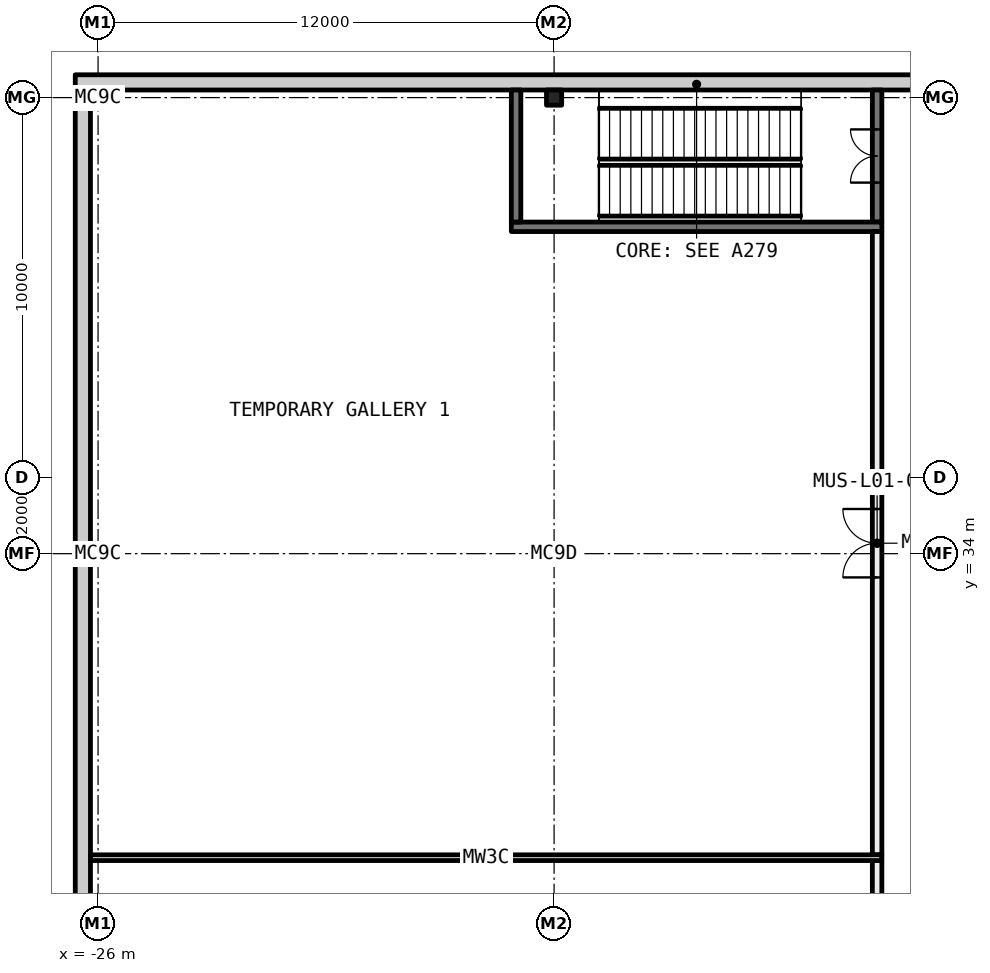
"""IFC4 building model, lengths in metres.
Left out: names, types, materials, properties, quantities, classifications, styles, units other than length and angle.
Written with IfcOpenShell. Run it as: python <this file> out.ifc"""

import sys

from ifc_helpers import new_model, si_unit, direction, frame, frame_2d, origin, origin_2d, place, context, subcontext, project, spatial, rectangle, i_section, extrude, element, fill, save


model = new_model("IFC4")
c1 = context("Model", 3, precision=1e-05, world=origin(), true_north=direction((0.0, 1.0)))
c2 = subcontext(c1, "Body", "Model", "MODEL_VIEW")
j1 = project(units=[si_unit("LENGTHUNIT", "METRE"), si_unit("PLANEANGLEUNIT", "RADIAN")], contexts=[c1])
p1 = place(None, origin())
s1 = spatial("IfcSite", under=j1, at=p1, CompositionType="ELEMENT")
p2 = place(p1, origin())
s2 = spatial("IfcBuilding", under=s1, at=p2, CompositionType="ELEMENT")
p3 = place(p2, frame((0.0, 0.0, 6.0)))
s3 = spatial("IfcBuildingStorey", under=s2, at=p3, CompositionType="ELEMENT", Elevation=6.0)
for number, where, z_axis, x_axis in (
    (1, (-26.0, 34.0, 0.0), (0.0, 0.0, 1.0), (1.0, 0.0, 0.0)),
    (2, (-26.0, 46.0, 0.0), (0.0, 0.0, 1.0), (1.0, 0.0, 0.0)),
    (3, (-14.0, 34.0, 0.0), (0.0, 0.0, 1.0), (1.0, 0.0, 0.0)),
    (4, (-14.0, 46.0, 0.0), (0.0, 0.0, 1.0), (1.0, 0.0, 0.0)),
):
    element("IfcColumn", number, at=place(p3, frame(where, z_axis=z_axis, x_axis=x_axis)), inside=s3, PredefinedType="COLUMN", context=c2, shape_type="SweptSolid", body=[
        extrude(i_section(OverallWidth=0.4, OverallDepth=0.4, WebThickness=0.013, FlangeThickness=0.021, FilletRadius=0.022, at=origin_2d()), origin(), (0.0, 0.0, 1.0), 5.6),
    ])
p4 = place(p3, frame((-5.5, 12.1, 0.0), z_axis=(0.0, 0.0, 1.0), x_axis=(0.0, 1.0, 0.0)))
e5 = element("IfcWall", 5, at=p4, inside=s3, PredefinedType="PARTITIONING", context=c2, shape_type="SweptSolid", body=[
    extrude(rectangle(XDim=13.825, YDim=0.25, at=frame_2d((6.913, 0.0))), origin(), (0.0, 0.0, 1.0), 5.6),
])
p5 = place(p4, frame((6.013, 0.0, 0.0)))
e6 = element("IfcOpeningElement", 6, at=p5, cuts=e5, PredefinedType="OPENING", context=c2, shape_type="SweptSolid", body=[
    extrude(rectangle(XDim=1.8, YDim=2.1, at=frame_2d((0.9, 1.05))), frame((0.0, 0.135, 0.0), z_axis=(0.0, -1.0, 0.0), x_axis=(1.0, 0.0, 0.0)), (0.0, 0.0, 1.0), 0.27),
])
p6 = place(p3, frame((-5.5, 42.725, 0.0), z_axis=(0.0, 0.0, 1.0), x_axis=(0.0, 1.0, 0.0)))
e7 = element("IfcWall", 7, at=p6, inside=s3, PredefinedType="SHEAR", context=c2, shape_type="SweptSolid", body=[
    extrude(rectangle(XDim=3.475, YDim=0.25, at=frame_2d((1.737, 0.0))), origin(), (0.0, 0.0, 1.0), 5.6),
])
p7 = place(p6, frame((1.038, 0.0, 0.0)))
e8 = element("IfcOpeningElement", 8, at=p7, cuts=e7, PredefinedType="OPENING", context=c2, shape_type="SweptSolid", body=[
    extrude(rectangle(XDim=1.4, YDim=2.1, at=frame_2d((0.7, 1.05))), frame((0.0, 0.135, 0.0), z_axis=(0.0, -1.0, 0.0), x_axis=(1.0, 0.0, 0.0)), (0.0, 0.0, 1.0), 0.27),
])
p8 = place(p3, frame((-5.5, 26.075, 0.0), z_axis=(0.0, 0.0, 1.0), x_axis=(0.0, 1.0, 0.0)))
e9 = element("IfcWall", 9, at=p8, inside=s3, PredefinedType="PARTITIONING", context=c2, shape_type="SweptSolid", body=[
    extrude(rectangle(XDim=16.4, YDim=0.25, at=frame_2d((8.2, 0.0))), origin(), (0.0, 0.0, 1.0), 5.6),
])
p9 = place(p8, frame((7.3, 0.0, 0.0)))
e10 = element("IfcOpeningElement", 10, at=p9, cuts=e9, PredefinedType="OPENING", context=c2, shape_type="SweptSolid", body=[
    extrude(rectangle(XDim=1.8, YDim=2.1, at=frame_2d((0.9, 1.05))), frame((0.0, 0.135, 0.0), z_axis=(0.0, -1.0, 0.0), x_axis=(1.0, 0.0, 0.0)), (0.0, 0.0, 1.0), 0.27),
])
p10 = place(p3, frame((-26.2, 26.0, 0.0), z_axis=(0.0, 0.0, 1.0), x_axis=(1.0, 0.0, 0.0)))
e11 = element("IfcWall", 11, at=p10, inside=s3, PredefinedType="PARTITIONING", context=c2, shape_type="SweptSolid", body=[
    extrude(rectangle(XDim=20.825, YDim=0.15, at=frame_2d((10.413, 0.0))), origin(), (0.0, 0.0, 1.0), 5.6),
])
p11 = place(p3, frame((-15.125, 42.6, 0.0), z_axis=(0.0, 0.0, 1.0), x_axis=(1.0, 0.0, 0.0)))
e12 = element("IfcWall", 12, at=p11, inside=s3, PredefinedType="SHEAR", context=c2, shape_type="SweptSolid", body=[
    extrude(rectangle(XDim=9.75, YDim=0.25, at=frame_2d((4.875, 0.0))), origin(), (0.0, 0.0, 1.0), 5.6),
])
p12 = place(p3, frame((-15.0, 42.725, 0.0), z_axis=(0.0, 0.0, 1.0), x_axis=(0.0, 1.0, 0.0)))
e13 = element("IfcWall", 13, at=p12, inside=s3, PredefinedType="SHEAR", context=c2, shape_type="SweptSolid", body=[
    extrude(rectangle(XDim=3.475, YDim=0.25, at=frame_2d((1.737, 0.0))), origin(), (0.0, 0.0, 1.0), 5.6),
])
p13 = place(p3, frame((-26.4, -26.2, -0.4), z_axis=(0.0, 0.0, 1.0), x_axis=(0.0, 1.0, 0.0)))
e14 = element("IfcWall", 14, at=p13, inside=s3, PredefinedType="STANDARD", context=c2, shape_type="SweptSolid", body=[
    extrude(rectangle(XDim=72.4, YDim=0.4, at=frame_2d((36.2, 0.0))), origin(), (0.0, 0.0, 1.0), 6.0),
])
p14 = place(p3, frame((-26.6, 46.4, -0.4), z_axis=(0.0, 0.0, 1.0), x_axis=(1.0, 0.0, 0.0)))
e15 = element("IfcWall", 15, at=p14, inside=s3, PredefinedType="STANDARD", context=c2, shape_type="SweptSolid", body=[
    extrude(rectangle(XDim=25.2, YDim=0.4, at=frame_2d((12.6, 0.0))), origin(), (0.0, 0.0, 1.0), 6.0),
])
p15 = place(p7, origin())
e16 = element("IfcDoor", 16, at=p15, inside=s3, OperationType="DOUBLE_DOOR_SINGLE_SWING", PredefinedType="DOOR", context=c2, shape_type="SweptSolid", body=[
    extrude(rectangle(XDim=1.4, YDim=2.1, at=frame_2d((0.7, 1.05))), frame((0.0, 0.025, 0.0), z_axis=(0.0, -1.0, 0.0), x_axis=(1.0, 0.0, 0.0)), (0.0, 0.0, 1.0), 0.05),
])
fill(e8, e16)
p16 = place(p9, origin())
e17 = element("IfcDoor", 17, at=p16, inside=s3, OperationType="DOUBLE_DOOR_SINGLE_SWING", PredefinedType="DOOR", context=c2, shape_type="SweptSolid", body=[
    extrude(rectangle(XDim=1.8, YDim=2.1, at=frame_2d((0.9, 1.05))), frame((0.0, 0.025, 0.0), z_axis=(0.0, -1.0, 0.0), x_axis=(1.0, 0.0, 0.0)), (0.0, 0.0, 1.0), 0.05),
])
fill(e10, e17)
save(model, sys.argv[1])
